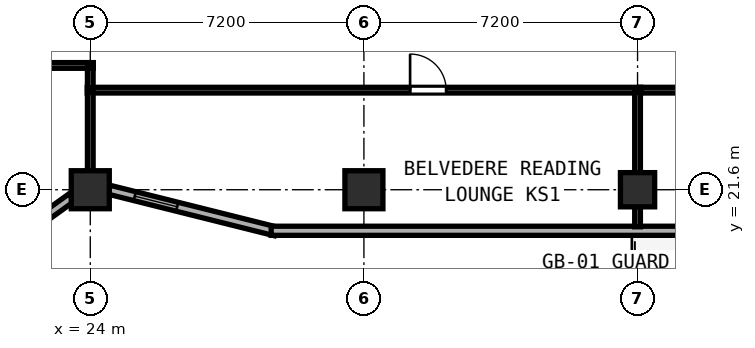
"""IFC4 building model, lengths in metres.
Left out: names, types, materials, properties, quantities, classifications, styles, units other than length and angle.
Written with IfcOpenShell. Run it as: python <this file> out.ifc"""

import sys

from ifc_helpers import new_model, si_unit, direction, frame, frame_2d, origin, origin_2d, place, context, subcontext, project, spatial, rectangle, hollow_rectangle, extrude, element, fill, save


model = new_model("IFC4")
c1 = context("Model", 3, precision=1e-05, world=origin(), true_north=direction((0.0, 1.0)))
c2 = subcontext(c1, "Body", "Model", "MODEL_VIEW")
j1 = project(units=[si_unit("LENGTHUNIT", "METRE"), si_unit("PLANEANGLEUNIT", "RADIAN")], contexts=[c1])
p1 = place(None, origin())
s1 = spatial("IfcSite", under=j1, at=p1, CompositionType="ELEMENT")
p2 = place(p1, origin())
s2 = spatial("IfcBuilding", under=s1, at=p2, CompositionType="ELEMENT")
p3 = place(p2, frame((0.0, 0.0, 128.8)))
s3 = spatial("IfcBuildingStorey", under=s2, at=p3, CompositionType="ELEMENT", Elevation=128.8)
for number, where, z_axis, x_axis in (
    (1, (24.0, 21.6, 0.0), (0.0, 0.0, 1.0), (1.0, 0.0, 0.0)),
    (2, (31.2, 21.6, 0.0), (0.0, 0.0, 1.0), (1.0, 0.0, 0.0)),
):
    element("IfcColumn", number, at=place(p3, frame(where, z_axis=z_axis, x_axis=x_axis)), inside=s3, PredefinedType="COLUMN", context=c2, shape_type="SweptSolid", body=[
        extrude(hollow_rectangle(XDim=1.0, YDim=1.0, WallThickness=0.038, at=origin_2d()), origin(), (0.0, 0.0, 1.0), 3.8),
    ])
p4 = place(p3, frame((38.4, 21.6, 0.0), z_axis=(0.0, 0.0, 1.0), x_axis=(1.0, 0.0, 0.0)))
e3 = element("IfcColumn", 3, at=p4, inside=s3, PredefinedType="COLUMN", context=c2, shape_type="SweptSolid", body=[
    extrude(hollow_rectangle(XDim=0.9, YDim=0.9, WallThickness=0.034, at=origin_2d()), origin(), (0.0, 0.0, 1.0), 3.8),
])
p5 = place(p3, frame((14.075, 14.602, 0.0), z_axis=(0.0, 0.0, 1.0), x_axis=(0.811543504691, 0.584291998913, 0.0)))
e4 = element("IfcWall", 4, at=p5, inside=s3, PredefinedType="SOLIDWALL", context=c2, shape_type="SweptSolid", body=[
    extrude(rectangle(XDim=11.623, YDim=0.24, at=frame_2d((5.812, 0.0))), origin(), (0.0, 0.0, 1.0), 3.145),
])
p6 = place(p5, frame((0.7, 0.0, 0.85)))
e5 = element("IfcOpeningElement", 5, at=p6, cuts=e4, PredefinedType="OPENING", context=c2, shape_type="SweptSolid", body=[
    extrude(rectangle(XDim=1.15, YDim=1.8, at=frame_2d((0.575, 0.9))), frame((0.0, 0.13, 0.0), z_axis=(0.0, -1.0, 0.0), x_axis=(1.0, 0.0, 0.0)), (0.0, 0.0, 1.0), 0.26),
])
p7 = place(p5, frame((6.1, 0.0, 0.85)))
e6 = element("IfcOpeningElement", 6, at=p7, cuts=e4, PredefinedType="OPENING", context=c2, shape_type="SweptSolid", body=[
    extrude(rectangle(XDim=1.15, YDim=1.8, at=frame_2d((0.575, 0.9))), frame((0.0, 0.13, 0.0), z_axis=(0.0, -1.0, 0.0), x_axis=(1.0, 0.0, 0.0)), (0.0, 0.0, 1.0), 0.26),
])
p8 = place(p3, frame((24.492, 21.601, 0.0), z_axis=(0.0, 0.0, 1.0), x_axis=(0.970145683738, -0.242522890311, 0.0)))
e7 = element("IfcWall", 7, at=p8, inside=s3, PredefinedType="SOLIDWALL", context=c2, shape_type="SweptSolid", body=[
    extrude(rectangle(XDim=4.511, YDim=0.24, at=frame_2d((2.255, 0.0))), origin(), (0.0, 0.0, 1.0), 3.145),
])
p9 = place(p8, frame((0.7, 0.0, 0.85)))
e8 = element("IfcOpeningElement", 8, at=p9, cuts=e7, PredefinedType="OPENING", context=c2, shape_type="SweptSolid", body=[
    extrude(rectangle(XDim=1.15, YDim=1.8, at=frame_2d((0.575, 0.9))), frame((0.0, 0.13, 0.0), z_axis=(0.0, -1.0, 0.0), x_axis=(1.0, 0.0, 0.0)), (0.0, 0.0, 1.0), 0.26),
])
p10 = place(p3, frame((28.76, 20.52, 0.0), z_axis=(0.0, 0.0, 1.0), x_axis=(1.0, 0.0, 0.0)))
e9 = element("IfcWall", 9, at=p10, inside=s3, PredefinedType="SOLIDWALL", context=c2, shape_type="SweptSolid", body=[
    extrude(rectangle(XDim=19.281, YDim=0.24, at=frame_2d((9.64, 0.0))), origin(), (0.0, 0.0, 1.0), 3.6),
])
p11 = place(p10, frame((15.64, 0.0, 0.0), z_axis=(0.0, 0.0, 1.0), x_axis=(-1.0, 0.0, 0.0)))
e10 = element("IfcOpeningElement", 10, at=p11, cuts=e9, PredefinedType="OPENING", context=c2, shape_type="SweptSolid", body=[
    extrude(rectangle(XDim=1.2, YDim=2.15, at=frame_2d((0.6, 1.075))), frame((0.0, 0.13, 0.0), z_axis=(0.0, -1.0, 0.0), x_axis=(1.0, 0.0, 0.0)), (0.0, 0.0, 1.0), 0.26),
])
p12 = place(p3, frame((23.92, 24.22, 0.0), z_axis=(0.0, 0.0, 1.0), x_axis=(1.0, 0.0, 0.0)))
e11 = element("IfcWall", 11, at=p12, inside=s3, PredefinedType="PARTITIONING", context=c2, shape_type="SweptSolid", body=[
    extrude(rectangle(XDim=14.56, YDim=0.15, at=frame_2d((7.28, 0.0))), origin(), (0.0, 0.0, 1.0), 3.6),
])
p13 = place(p12, frame((9.445, 0.0, 0.0), z_axis=(0.0, 0.0, 1.0), x_axis=(-1.0, 0.0, 0.0)))
e12 = element("IfcOpeningElement", 12, at=p13, cuts=e11, PredefinedType="OPENING", context=c2, shape_type="SweptSolid", body=[
    extrude(rectangle(XDim=0.95, YDim=2.12, at=frame_2d((0.475, 1.06))), frame((0.0, 0.085, 0.0), z_axis=(0.0, -1.0, 0.0), x_axis=(1.0, 0.0, 0.0)), (0.0, 0.0, 1.0), 0.17),
])
p14 = place(p3, frame((24.0, 21.819, 0.0), z_axis=(0.0, 0.0, 1.0), x_axis=(0.0, 1.0, 0.0)))
e13 = element("IfcWall", 13, at=p14, inside=s3, PredefinedType="PARTITIONING", context=c2, shape_type="SweptSolid", body=[
    extrude(rectangle(XDim=2.341, YDim=0.15, at=frame_2d((1.171, 0.0))), origin(), (0.0, 0.0, 1.0), 3.145),
])
p15 = place(p3, frame((38.4, 20.625, 0.0), z_axis=(0.0, 0.0, 1.0), x_axis=(0.0, 1.0, 0.0)))
e14 = element("IfcWall", 14, at=p15, inside=s3, PredefinedType="PARTITIONING", context=c2, shape_type="SweptSolid", body=[
    extrude(rectangle(XDim=3.535, YDim=0.15, at=frame_2d((1.768, 0.0))), origin(), (0.0, 0.0, 1.0), 3.085),
])
p16 = place(p3, frame((38.482, 24.22, 0.0), z_axis=(0.0, 0.0, 1.0), x_axis=(1.0, 0.0, 0.0)))
e15 = element("IfcWall", 15, at=p16, inside=s3, PredefinedType="PARTITIONING", context=c2, shape_type="SweptSolid", body=[
    extrude(rectangle(XDim=7.198, YDim=0.15, at=frame_2d((3.599, 0.0))), origin(), (0.0, 0.0, 1.0), 3.6),
])
p17 = place(p16, frame((3.913, 0.0, 0.0), z_axis=(0.0, 0.0, 1.0), x_axis=(-1.0, 0.0, 0.0)))
e16 = element("IfcOpeningElement", 16, at=p17, cuts=e15, PredefinedType="OPENING", context=c2, shape_type="SweptSolid", body=[
    extrude(rectangle(XDim=0.95, YDim=2.12, at=frame_2d((0.475, 1.06))), frame((0.0, 0.085, 0.0), z_axis=(0.0, -1.0, 0.0), x_axis=(1.0, 0.0, 0.0)), (0.0, 0.0, 1.0), 0.17),
])
p18 = place(p3, frame((20.442, 24.87, 0.0), z_axis=(0.0, 0.0, 1.0), x_axis=(1.0, 0.0, 0.0)))
e17 = element("IfcWall", 17, at=p18, inside=s3, PredefinedType="PARTITIONING", context=c2, shape_type="SweptSolid", body=[
    extrude(rectangle(XDim=3.638, YDim=0.15, at=frame_2d((1.819, 0.0))), origin(), (0.0, 0.0, 1.0), 3.235),
])
p19 = place(p18, frame((2.123, 0.0, 0.0), z_axis=(0.0, 0.0, 1.0), x_axis=(-1.0, 0.0, 0.0)))
e18 = element("IfcOpeningElement", 18, at=p19, cuts=e17, PredefinedType="OPENING", context=c2, shape_type="SweptSolid", body=[
    extrude(rectangle(XDim=0.95, YDim=2.12, at=frame_2d((0.475, 1.06))), frame((0.0, 0.085, 0.0), z_axis=(0.0, -1.0, 0.0), x_axis=(1.0, 0.0, 0.0)), (0.0, 0.0, 1.0), 0.17),
])
p20 = place(p3, frame((24.0, 24.28, 0.0), z_axis=(0.0, 0.0, 1.0), x_axis=(0.0, 1.0, 0.0)))
e19 = element("IfcWall", 19, at=p20, inside=s3, PredefinedType="PARTITIONING", context=c2, shape_type="SweptSolid", body=[
    extrude(rectangle(XDim=0.53, YDim=0.15, at=frame_2d((0.265, 0.0))), origin(), (0.0, 0.0, 1.0), 3.145),
])
p21 = place(p9, origin())
e20 = element("IfcWindow", 20, at=p21, inside=s3, PartitioningType="SINGLE_PANEL", PredefinedType="WINDOW", context=c2, shape_type="SweptSolid", body=[
    extrude(rectangle(XDim=1.15, YDim=1.8, at=frame_2d((0.575, 0.9))), frame((0.0, 0.03, 0.0), z_axis=(0.0, -1.0, 0.0), x_axis=(1.0, 0.0, 0.0)), (0.0, 0.0, 1.0), 0.06),
])
fill(e8, e20)
p22 = place(p13, origin())
e21 = element("IfcDoor", 21, at=p22, inside=s3, OperationType="SINGLE_SWING_RIGHT", PredefinedType="DOOR", context=c2, shape_type="SweptSolid", body=[
    extrude(rectangle(XDim=0.95, YDim=2.12, at=frame_2d((0.475, 1.06))), frame((0.0, 0.025, 0.0), z_axis=(0.0, -1.0, 0.0), x_axis=(1.0, 0.0, 0.0)), (0.0, 0.0, 1.0), 0.05),
])
fill(e12, e21)
save(model, sys.argv[1])
